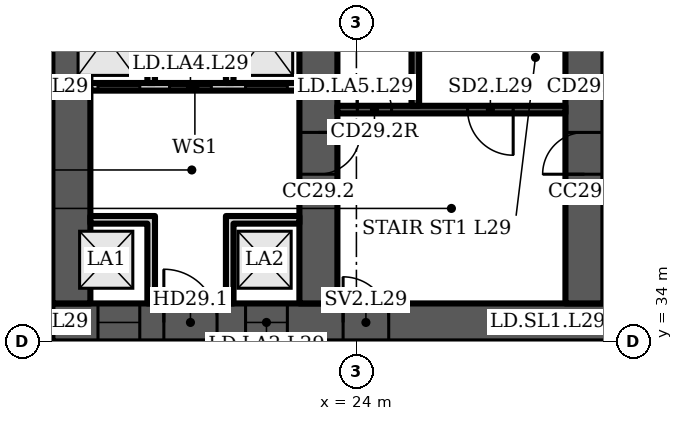
"""IFC4 building model, lengths in metres.
Left out: names, types, materials, properties, quantities, classifications, styles, units other than length and angle.
Written with IfcOpenShell. Run it as: python <this file> out.ifc"""

import sys

from ifc_helpers import new_model, si_unit, direction, frame, frame_2d, origin, place, context, subcontext, project, spatial, polyline, rectangle, outline, extrude, element, fill, save


model = new_model("IFC4")
c1 = context("Model", 3, precision=1e-05, world=origin(), true_north=direction((0.0, 1.0)))
c2 = subcontext(c1, "Body", "Model", "MODEL_VIEW")
j1 = project(units=[si_unit("LENGTHUNIT", "METRE"), si_unit("PLANEANGLEUNIT", "RADIAN")], contexts=[c1])
p1 = place(None, origin())
s1 = spatial("IfcSite", under=j1, at=p1, CompositionType="ELEMENT")
p2 = place(p1, origin())
s2 = spatial("IfcBuilding", under=s1, at=p2, CompositionType="ELEMENT")
p3 = place(p2, frame((0.0, 0.0, 125.5)))
s3 = spatial("IfcBuildingStorey", under=s2, at=p3, CompositionType="ELEMENT", Elevation=125.5)
p4 = place(p3, frame((16.0, 34.5, 0.0), z_axis=(0.0, 0.0, 1.0), x_axis=(1.0, 0.0, 0.0)))
e1 = element("IfcWall", 1, at=p4, inside=s3, PredefinedType="SHEAR", context=c2, shape_type="SweptSolid", body=[
    extrude(rectangle(XDim=49.0, YDim=1.0, at=frame_2d((24.5, 0.0))), origin(), (0.0, 0.0, 1.0), 3.6),
])
p5 = place(p4, frame((1.2, 0.0, 0.0)))
e2 = element("IfcOpeningElement", 2, at=p5, cuts=e1, PredefinedType="OPENING", context=c2, shape_type="SweptSolid", body=[
    extrude(rectangle(XDim=1.1, YDim=2.1, at=frame_2d((0.55, 1.05))), frame((0.0, 0.51, 0.0), z_axis=(0.0, -1.0, 0.0), x_axis=(1.0, 0.0, 0.0)), (0.0, 0.0, 1.0), 1.02),
])
p6 = place(p4, frame((5.083, 0.0, 0.0)))
e3 = element("IfcOpeningElement", 3, at=p6, cuts=e1, PredefinedType="OPENING", context=c2, shape_type="SweptSolid", body=[
    extrude(rectangle(XDim=1.1, YDim=2.1, at=frame_2d((0.55, 1.05))), frame((0.0, 0.51, 0.0), z_axis=(0.0, -1.0, 0.0), x_axis=(1.0, 0.0, 0.0)), (0.0, 0.0, 1.0), 1.02),
])
p7 = place(p4, frame((2.933, 0.0, 0.0)))
e4 = element("IfcOpeningElement", 4, at=p7, cuts=e1, PredefinedType="OPENING", context=c2, shape_type="SweptSolid", body=[
    extrude(rectangle(XDim=1.4, YDim=2.1, at=frame_2d((0.7, 1.05))), frame((0.0, 0.51, 0.0), z_axis=(0.0, -1.0, 0.0), x_axis=(1.0, 0.0, 0.0)), (0.0, 0.0, 1.0), 1.02),
])
p8 = place(p4, frame((7.65, 0.0, 0.0)))
e5 = element("IfcOpeningElement", 5, at=p8, cuts=e1, PredefinedType="OPENING", context=c2, shape_type="SweptSolid", body=[
    extrude(rectangle(XDim=1.2, YDim=2.1, at=frame_2d((0.6, 1.05))), frame((0.0, 0.51, 0.0), z_axis=(0.0, -1.0, 0.0), x_axis=(1.0, 0.0, 0.0)), (0.0, 0.0, 1.0), 1.02),
])
p9 = place(p4, frame((14.817, 0.0, 0.0)))
e6 = element("IfcOpeningElement", 6, at=p9, cuts=e1, PredefinedType="OPENING", context=c2, shape_type="SweptSolid", body=[
    extrude(rectangle(XDim=1.1, YDim=2.1, at=frame_2d((0.55, 1.05))), frame((0.0, 0.51, 0.0), z_axis=(0.0, -1.0, 0.0), x_axis=(1.0, 0.0, 0.0)), (0.0, 0.0, 1.0), 1.02),
])
p10 = place(p4, frame((19.083, 0.0, 0.0)))
e7 = element("IfcOpeningElement", 7, at=p10, cuts=e1, PredefinedType="OPENING", context=c2, shape_type="SweptSolid", body=[
    extrude(rectangle(XDim=1.1, YDim=2.1, at=frame_2d((0.55, 1.05))), frame((0.0, 0.51, 0.0), z_axis=(0.0, -1.0, 0.0), x_axis=(1.0, 0.0, 0.0)), (0.0, 0.0, 1.0), 1.02),
])
p11 = place(p4, frame((16.8, 0.0, 0.0)))
e8 = element("IfcOpeningElement", 8, at=p11, cuts=e1, PredefinedType="OPENING", context=c2, shape_type="SweptSolid", body=[
    extrude(rectangle(XDim=1.4, YDim=2.1, at=frame_2d((0.7, 1.05))), frame((0.0, 0.51, 0.0), z_axis=(0.0, -1.0, 0.0), x_axis=(1.0, 0.0, 0.0)), (0.0, 0.0, 1.0), 1.02),
])
p12 = place(p4, frame((21.817, 0.0, 0.0)))
e9 = element("IfcOpeningElement", 9, at=p12, cuts=e1, PredefinedType="OPENING", context=c2, shape_type="SweptSolid", body=[
    extrude(rectangle(XDim=1.1, YDim=2.1, at=frame_2d((0.55, 1.05))), frame((0.0, 0.51, 0.0), z_axis=(0.0, -1.0, 0.0), x_axis=(1.0, 0.0, 0.0)), (0.0, 0.0, 1.0), 1.02),
])
p13 = place(p4, frame((26.083, 0.0, 0.0)))
e10 = element("IfcOpeningElement", 10, at=p13, cuts=e1, PredefinedType="OPENING", context=c2, shape_type="SweptSolid", body=[
    extrude(rectangle(XDim=1.1, YDim=2.1, at=frame_2d((0.55, 1.05))), frame((0.0, 0.51, 0.0), z_axis=(0.0, -1.0, 0.0), x_axis=(1.0, 0.0, 0.0)), (0.0, 0.0, 1.0), 1.02),
])
p14 = place(p4, frame((33.15, 0.0, 0.0)))
e11 = element("IfcOpeningElement", 11, at=p14, cuts=e1, PredefinedType="OPENING", context=c2, shape_type="SweptSolid", body=[
    extrude(rectangle(XDim=1.2, YDim=2.1, at=frame_2d((0.6, 1.05))), frame((0.0, 0.51, 0.0), z_axis=(0.0, -1.0, 0.0), x_axis=(1.0, 0.0, 0.0)), (0.0, 0.0, 1.0), 1.02),
])
p15 = place(p4, frame((37.8, 0.0, 0.0)))
e12 = element("IfcOpeningElement", 12, at=p15, cuts=e1, PredefinedType="OPENING", context=c2, shape_type="SweptSolid", body=[
    extrude(rectangle(XDim=1.4, YDim=2.1, at=frame_2d((0.7, 1.05))), frame((0.0, 0.51, 0.0), z_axis=(0.0, -1.0, 0.0), x_axis=(1.0, 0.0, 0.0)), (0.0, 0.0, 1.0), 1.02),
])
p16 = place(p4, frame((42.817, 0.0, 0.0)))
e13 = element("IfcOpeningElement", 13, at=p16, cuts=e1, PredefinedType="OPENING", context=c2, shape_type="SweptSolid", body=[
    extrude(rectangle(XDim=1.1, YDim=2.1, at=frame_2d((0.55, 1.05))), frame((0.0, 0.51, 0.0), z_axis=(0.0, -1.0, 0.0), x_axis=(1.0, 0.0, 0.0)), (0.0, 0.0, 1.0), 1.02),
])
p17 = place(p4, frame((46.7, 0.0, 0.0)))
e14 = element("IfcOpeningElement", 14, at=p17, cuts=e1, PredefinedType="OPENING", context=c2, shape_type="SweptSolid", body=[
    extrude(rectangle(XDim=1.1, YDim=2.1, at=frame_2d((0.55, 1.05))), frame((0.0, 0.51, 0.0), z_axis=(0.0, -1.0, 0.0), x_axis=(1.0, 0.0, 0.0)), (0.0, 0.0, 1.0), 1.02),
])
p18 = place(p4, frame((44.667, 0.0, 0.0)))
e15 = element("IfcOpeningElement", 15, at=p18, cuts=e1, PredefinedType="OPENING", context=c2, shape_type="SweptSolid", body=[
    extrude(rectangle(XDim=1.4, YDim=2.1, at=frame_2d((0.7, 1.05))), frame((0.0, 0.51, 0.0), z_axis=(0.0, -1.0, 0.0), x_axis=(1.0, 0.0, 0.0)), (0.0, 0.0, 1.0), 1.02),
])
p19 = place(p3, frame((16.5, 35.0, 0.0), z_axis=(0.0, 0.0, 1.0), x_axis=(0.0, 1.0, 0.0)))
e16 = element("IfcWall", 16, at=p19, inside=s3, PredefinedType="SHEAR", context=c2, shape_type="SweptSolid", body=[
    extrude(rectangle(XDim=12.784, YDim=1.0, at=frame_2d((6.392, 0.0))), origin(), (0.0, 0.0, 1.0), 3.6),
])
p20 = place(p3, frame((23.0, 35.0, 0.0), z_axis=(0.0, 0.0, 1.0), x_axis=(0.0, 1.0, 0.0)))
e17 = element("IfcWall", 17, at=p20, inside=s3, PredefinedType="SHEAR", context=c2, shape_type="SweptSolid", body=[
    extrude(rectangle(XDim=13.352, YDim=1.0, at=frame_2d((6.676, 0.0))), origin(), (0.0, 0.0, 1.0), 3.6),
])
p21 = place(p20, frame((10.426, 0.0, 0.0)))
e18 = element("IfcOpeningElement", 18, at=p21, cuts=e17, PredefinedType="OPENING", context=c2, shape_type="SweptSolid", body=[
    extrude(rectangle(XDim=1.0, YDim=2.1, at=frame_2d((0.5, 1.05))), frame((0.0, 0.51, 0.0), z_axis=(0.0, -1.0, 0.0), x_axis=(1.0, 0.0, 0.0)), (0.0, 0.0, 1.0), 1.02),
])
p22 = place(p20, frame((3.4, 0.0, 0.0)))
e19 = element("IfcOpeningElement", 19, at=p22, cuts=e17, PredefinedType="OPENING", context=c2, shape_type="SweptSolid", body=[
    extrude(rectangle(XDim=1.1, YDim=2.1, at=frame_2d((0.55, 1.05))), frame((0.0, 0.51, 0.0), z_axis=(0.0, -1.0, 0.0), x_axis=(1.0, 0.0, 0.0)), (0.0, 0.0, 1.0), 1.02),
])
p23 = place(p3, frame((30.0, 35.0, 0.0), z_axis=(0.0, 0.0, 1.0), x_axis=(0.0, 1.0, 0.0)))
e20 = element("IfcWall", 20, at=p23, inside=s3, PredefinedType="SHEAR", context=c2, shape_type="SweptSolid", body=[
    extrude(rectangle(XDim=13.965, YDim=1.0, at=frame_2d((6.982, 0.0))), origin(), (0.0, 0.0, 1.0), 3.6),
])
p24 = place(p23, frame((3.4, 0.0, 0.0)))
e21 = element("IfcOpeningElement", 21, at=p24, cuts=e20, PredefinedType="OPENING", context=c2, shape_type="SweptSolid", body=[
    extrude(rectangle(XDim=1.1, YDim=2.1, at=frame_2d((0.55, 1.05))), frame((0.0, 0.51, 0.0), z_axis=(0.0, -1.0, 0.0), x_axis=(1.0, 0.0, 0.0)), (0.0, 0.0, 1.0), 1.02),
])
p25 = place(p3, frame((17.0, 40.7, 0.0), z_axis=(0.0, 0.0, 1.0), x_axis=(1.0, 0.0, 0.0)))
e22 = element("IfcWall", 22, at=p25, inside=s3, PredefinedType="PARTITIONING", context=c2, shape_type="SweptSolid", body=[
    extrude(rectangle(XDim=5.5, YDim=0.2, at=frame_2d((2.75, 0.0))), origin(), (0.0, 0.0, 1.0), 3.2),
])
p26 = place(p25, frame((0.2, 0.0, 0.0)))
e23 = element("IfcOpeningElement", 23, at=p26, cuts=e22, PredefinedType="OPENING", context=c2, shape_type="SweptSolid", body=[
    extrude(rectangle(XDim=1.1, YDim=2.1, at=frame_2d((0.55, 1.05))), frame((0.0, 0.11, 0.0), z_axis=(0.0, -1.0, 0.0), x_axis=(1.0, 0.0, 0.0)), (0.0, 0.0, 1.0), 0.22),
])
p27 = place(p25, frame((2.083, 0.0, 0.0)))
e24 = element("IfcOpeningElement", 24, at=p27, cuts=e22, PredefinedType="OPENING", context=c2, shape_type="SweptSolid", body=[
    extrude(rectangle(XDim=1.1, YDim=2.1, at=frame_2d((0.55, 1.05))), frame((0.0, 0.11, 0.0), z_axis=(0.0, -1.0, 0.0), x_axis=(1.0, 0.0, 0.0)), (0.0, 0.0, 1.0), 0.22),
])
p28 = place(p25, frame((4.083, 0.0, 0.0)))
e25 = element("IfcOpeningElement", 25, at=p28, cuts=e22, PredefinedType="OPENING", context=c2, shape_type="SweptSolid", body=[
    extrude(rectangle(XDim=1.1, YDim=2.1, at=frame_2d((0.55, 1.05))), frame((0.0, 0.11, 0.0), z_axis=(0.0, -1.0, 0.0), x_axis=(1.0, 0.0, 0.0)), (0.0, 0.0, 1.0), 0.22),
])
p29 = place(p3, frame((0.0, 0.0, -0.0)))
e26 = element("IfcWall", 26, at=p29, inside=s3, PredefinedType="PARTITIONING", context=c2, shape_type="SweptSolid", body=[
    extrude(outline(polyline([(18.5, 37.1), (17.0, 37.1), (17.0, 37.3), (18.5, 37.3), (18.7, 37.3), (18.7, 35.0), (18.5, 35.0), (18.5, 37.1)])), origin(), (0.0, 0.0, 1.0), 3.2),
])
p30 = place(p3, frame((0.0, 0.0, -0.0)))
e27 = element("IfcWall", 27, at=p30, inside=s3, PredefinedType="PARTITIONING", context=c2, shape_type="SweptSolid", body=[
    extrude(outline(polyline([(20.567, 37.3), (20.767, 37.3), (22.5, 37.3), (22.5, 37.1), (20.767, 37.1), (20.767, 35.0), (20.567, 35.0), (20.567, 37.3)])), origin(), (0.0, 0.0, 1.0), 3.2),
])
p31 = place(p3, frame((0.0, 0.0, -0.0)))
e28 = element("IfcWall", 28, at=p31, inside=s3, PredefinedType="PARTITIONING", context=c2, shape_type="SweptSolid", body=[
    extrude(outline(polyline([(18.7, 40.8), (18.5, 40.8), (18.5, 43.8), (17.0, 43.8), (17.0, 44.0), (22.5, 44.0), (22.5, 43.8), (20.767, 43.8), (20.767, 40.8), (20.567, 40.8), (20.567, 43.8), (18.7, 43.8), (18.7, 40.8)])), origin(), (0.0, 0.0, 1.0), 3.2),
])
p32 = place(p3, frame((23.5, 40.1, 0.0), z_axis=(0.0, 0.0, 1.0), x_axis=(1.0, 0.0, 0.0)))
e29 = element("IfcWall", 29, at=p32, inside=s3, PredefinedType="SHEAR", context=c2, shape_type="SweptSolid", body=[
    extrude(rectangle(XDim=6.0, YDim=0.2, at=frame_2d((3.0, 0.0))), origin(), (0.0, 0.0, 1.0), 3.2),
])
p33 = place(p32, frame((3.425, 0.0, 0.0)))
e30 = element("IfcOpeningElement", 30, at=p33, cuts=e29, PredefinedType="OPENING", context=c2, shape_type="SweptSolid", body=[
    extrude(rectangle(XDim=1.2, YDim=2.1, at=frame_2d((0.6, 1.05))), frame((0.0, 0.11, 0.0), z_axis=(0.0, -1.0, 0.0), x_axis=(1.0, 0.0, 0.0)), (0.0, 0.0, 1.0), 0.22),
])
p34 = place(p32, frame((0.525, 0.0, 0.0)))
e31 = element("IfcOpeningElement", 31, at=p34, cuts=e29, PredefinedType="OPENING", context=c2, shape_type="SweptSolid", body=[
    extrude(rectangle(XDim=0.9, YDim=2.1, at=frame_2d((0.45, 1.05))), frame((0.0, 0.11, 0.0), z_axis=(0.0, -1.0, 0.0), x_axis=(1.0, 0.0, 0.0)), (0.0, 0.0, 1.0), 0.22),
])
p35 = place(p3, frame((25.55, 40.2, 0.0), z_axis=(0.0, 0.0, 1.0), x_axis=(0.0, 1.0, 0.0)))
e32 = element("IfcWall", 32, at=p35, inside=s3, PredefinedType="SHEAR", context=c2, shape_type="SweptSolid", body=[
    extrude(rectangle(XDim=7.2, YDim=0.2, at=frame_2d((3.6, 0.0))), origin(), (0.0, 0.0, 1.0), 3.2),
])
p36 = place(p5, origin())
e33 = element("IfcDoor", 33, at=p36, inside=s3, OperationType="DOUBLE_DOOR_SLIDING", PredefinedType="DOOR", context=c2, shape_type="SweptSolid", body=[
    extrude(rectangle(XDim=1.1, YDim=2.1, at=frame_2d((0.55, 1.05))), frame((0.0, 0.025, 0.0), z_axis=(0.0, -1.0, 0.0), x_axis=(1.0, 0.0, 0.0)), (0.0, 0.0, 1.0), 0.05),
])
fill(e2, e33)
p37 = place(p6, origin())
e34 = element("IfcDoor", 34, at=p37, inside=s3, OperationType="DOUBLE_DOOR_SLIDING", PredefinedType="DOOR", context=c2, shape_type="SweptSolid", body=[
    extrude(rectangle(XDim=1.1, YDim=2.1, at=frame_2d((0.55, 1.05))), frame((0.0, 0.025, 0.0), z_axis=(0.0, -1.0, 0.0), x_axis=(1.0, 0.0, 0.0)), (0.0, 0.0, 1.0), 0.05),
])
fill(e3, e34)
p38 = place(p7, origin())
e35 = element("IfcDoor", 35, at=p38, inside=s3, OperationType="DOUBLE_DOOR_SINGLE_SWING", PredefinedType="DOOR", context=c2, shape_type="SweptSolid", body=[
    extrude(rectangle(XDim=1.4, YDim=2.1, at=frame_2d((0.7, 1.05))), frame((0.0, 0.025, 0.0), z_axis=(0.0, -1.0, 0.0), x_axis=(1.0, 0.0, 0.0)), (0.0, 0.0, 1.0), 0.05),
])
fill(e4, e35)
p39 = place(p26, origin())
e36 = element("IfcDoor", 36, at=p39, inside=s3, OperationType="DOUBLE_DOOR_SLIDING", PredefinedType="DOOR", context=c2, shape_type="SweptSolid", body=[
    extrude(rectangle(XDim=1.1, YDim=2.1, at=frame_2d((0.55, 1.05))), frame((0.0, 0.025, 0.0), z_axis=(0.0, -1.0, 0.0), x_axis=(1.0, 0.0, 0.0)), (0.0, 0.0, 1.0), 0.05),
])
fill(e23, e36)
p40 = place(p27, origin())
e37 = element("IfcDoor", 37, at=p40, inside=s3, OperationType="DOUBLE_DOOR_SLIDING", PredefinedType="DOOR", context=c2, shape_type="SweptSolid", body=[
    extrude(rectangle(XDim=1.1, YDim=2.1, at=frame_2d((0.55, 1.05))), frame((0.0, 0.025, 0.0), z_axis=(0.0, -1.0, 0.0), x_axis=(1.0, 0.0, 0.0)), (0.0, 0.0, 1.0), 0.05),
])
fill(e24, e37)
p41 = place(p28, origin())
e38 = element("IfcDoor", 38, at=p41, inside=s3, OperationType="DOUBLE_DOOR_SLIDING", PredefinedType="DOOR", context=c2, shape_type="SweptSolid", body=[
    extrude(rectangle(XDim=1.1, YDim=2.1, at=frame_2d((0.55, 1.05))), frame((0.0, 0.025, 0.0), z_axis=(0.0, -1.0, 0.0), x_axis=(1.0, 0.0, 0.0)), (0.0, 0.0, 1.0), 0.05),
])
fill(e25, e38)
p42 = place(p33, origin())
e39 = element("IfcDoor", 39, at=p42, inside=s3, OperationType="SINGLE_SWING_RIGHT", PredefinedType="DOOR", context=c2, shape_type="SweptSolid", body=[
    extrude(rectangle(XDim=1.2, YDim=2.1, at=frame_2d((0.6, 1.05))), frame((0.0, 0.025, 0.0), z_axis=(0.0, -1.0, 0.0), x_axis=(1.0, 0.0, 0.0)), (0.0, 0.0, 1.0), 0.05),
])
fill(e30, e39)
p43 = place(p34, origin())
e40 = element("IfcDoor", 40, at=p43, inside=s3, OperationType="SINGLE_SWING_LEFT", PredefinedType="DOOR", context=c2, shape_type="SweptSolid", body=[
    extrude(rectangle(XDim=0.9, YDim=2.1, at=frame_2d((0.45, 1.05))), frame((0.0, 0.025, 0.0), z_axis=(0.0, -1.0, 0.0), x_axis=(1.0, 0.0, 0.0)), (0.0, 0.0, 1.0), 0.05),
])
fill(e31, e40)
p44 = place(p8, origin())
e41 = element("IfcDoor", 41, at=p44, inside=s3, OperationType="SINGLE_SWING_LEFT", PredefinedType="DOOR", context=c2, shape_type="SweptSolid", body=[
    extrude(rectangle(XDim=1.2, YDim=2.1, at=frame_2d((0.6, 1.05))), frame((0.0, 0.025, 0.0), z_axis=(0.0, -1.0, 0.0), x_axis=(1.0, 0.0, 0.0)), (0.0, 0.0, 1.0), 0.05),
])
fill(e5, e41)
p45 = place(p22, origin())
e42 = element("IfcDoor", 42, at=p45, inside=s3, OperationType="SINGLE_SWING_RIGHT", PredefinedType="DOOR", context=c2, shape_type="SweptSolid", body=[
    extrude(rectangle(XDim=1.1, YDim=2.1, at=frame_2d((0.55, 1.05))), frame((0.0, 0.025, 0.0), z_axis=(0.0, -1.0, 0.0), x_axis=(1.0, 0.0, 0.0)), (0.0, 0.0, 1.0), 0.05),
])
fill(e19, e42)
p46 = place(p24, origin())
e43 = element("IfcDoor", 43, at=p46, inside=s3, OperationType="SINGLE_SWING_LEFT", PredefinedType="DOOR", context=c2, shape_type="SweptSolid", body=[
    extrude(rectangle(XDim=1.1, YDim=2.1, at=frame_2d((0.55, 1.05))), frame((0.0, 0.025, 0.0), z_axis=(0.0, -1.0, 0.0), x_axis=(1.0, 0.0, 0.0)), (0.0, 0.0, 1.0), 0.05),
])
fill(e21, e43)
save(model, sys.argv[1])
